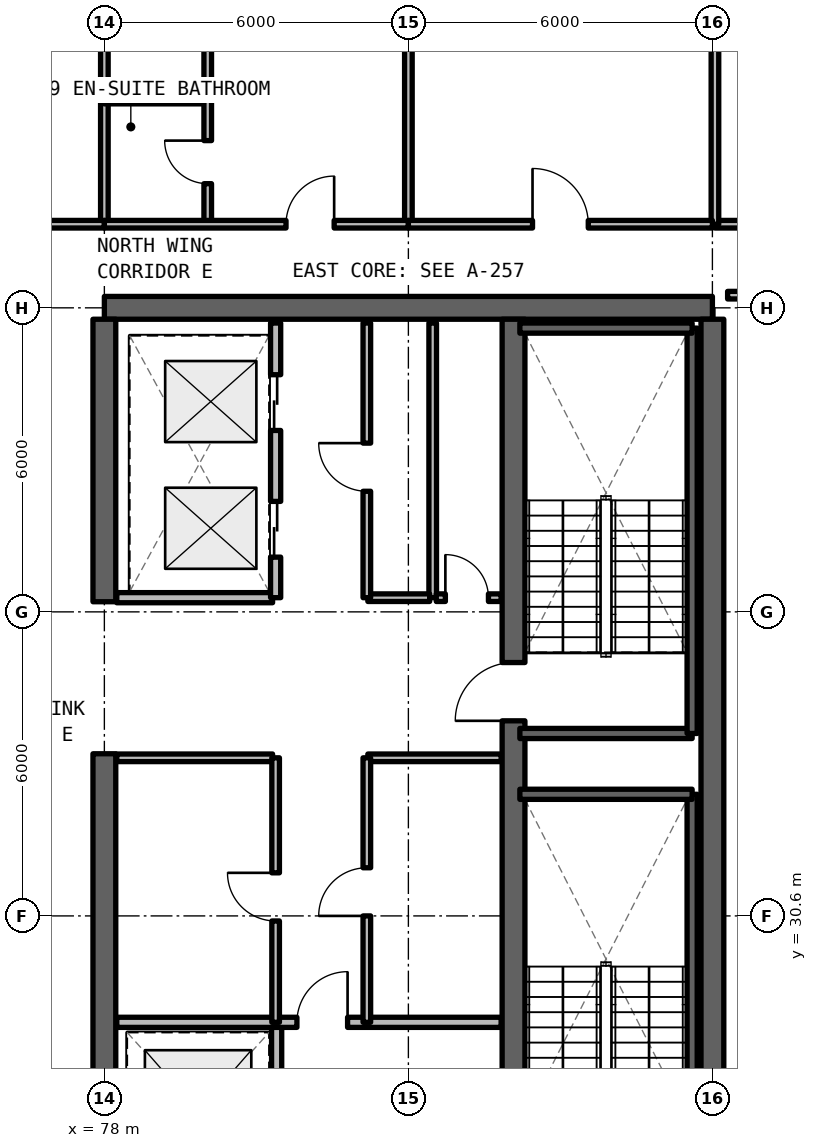
"""IFC4 building model, lengths in metres.
Left out: names, types, materials, properties, quantities, classifications, styles, units other than length and angle.
Written with IfcOpenShell. Run it as: python <this file> out.ifc"""

import sys

from ifc_helpers import new_model, si_unit, direction, frame, frame_2d, origin, place, context, subcontext, project, spatial, rectangle, extrude, element, fill, save


model = new_model("IFC4")
c1 = context("Model", 3, precision=1e-05, world=origin(), true_north=direction((0.0, 1.0)))
c2 = subcontext(c1, "Body", "Model", "MODEL_VIEW")
j1 = project(units=[si_unit("LENGTHUNIT", "METRE"), si_unit("PLANEANGLEUNIT", "RADIAN")], contexts=[c1])
p1 = place(None, origin())
s1 = spatial("IfcSite", under=j1, at=p1, CompositionType="ELEMENT")
p2 = place(p1, origin())
s2 = spatial("IfcBuilding", under=s1, at=p2, CompositionType="ELEMENT")
p3 = place(p2, frame((0.0, 0.0, 260.7)))
s3 = spatial("IfcBuildingStorey", under=s2, at=p3, CompositionType="ELEMENT", Elevation=260.7)
p4 = place(p3, frame((90.0, 42.6, 0.0), z_axis=(0.0, 0.0, 1.0), x_axis=(-1.0, 0.0, 0.0)))
e1 = element("IfcWall", 1, at=p4, inside=s3, PredefinedType="SHEAR", context=c2, shape_type="SweptSolid", body=[
    extrude(rectangle(XDim=12.0, YDim=0.45, at=frame_2d((6.0, 0.0))), origin(), (0.0, 0.0, 1.0), 3.63),
])
p5 = place(p3, frame((90.0, 24.825, 0.0), z_axis=(0.0, 0.0, 1.0), x_axis=(0.0, 1.0, 0.0)))
e2 = element("IfcWall", 2, at=p5, inside=s3, PredefinedType="SHEAR", context=c2, shape_type="SweptSolid", body=[
    extrude(rectangle(XDim=17.55, YDim=0.45, at=frame_2d((8.775, 0.0))), origin(), (0.0, 0.0, 1.0), 3.63),
])
p6 = place(p3, frame((78.0, 24.825, 0.0), z_axis=(0.0, 0.0, 1.0), x_axis=(0.0, 1.0, 0.0)))
e3 = element("IfcWall", 3, at=p6, inside=s3, PredefinedType="SHEAR", context=c2, shape_type="SweptSolid", body=[
    extrude(rectangle(XDim=8.975, YDim=0.45, at=frame_2d((4.488, 0.0))), origin(), (0.0, 0.0, 1.0), 3.63),
])
p7 = place(p3, frame((78.0, 36.8, 0.0), z_axis=(0.0, 0.0, 1.0), x_axis=(0.0, 1.0, 0.0)))
e4 = element("IfcWall", 4, at=p7, inside=s3, PredefinedType="SHEAR", context=c2, shape_type="SweptSolid", body=[
    extrude(rectangle(XDim=5.575, YDim=0.45, at=frame_2d((2.788, 0.0))), origin(), (0.0, 0.0, 1.0), 3.63),
])
p8 = place(p3, frame((86.075, 24.825, 0.0), z_axis=(0.0, 0.0, 1.0), x_axis=(0.0, 1.0, 0.0)))
e5 = element("IfcWall", 5, at=p8, inside=s3, PredefinedType="SHEAR", context=c2, shape_type="SweptSolid", body=[
    extrude(rectangle(XDim=17.55, YDim=0.45, at=frame_2d((8.775, 0.0))), origin(), (0.0, 0.0, 1.0), 3.63),
])
p9 = place(p8, frame((0.425, 0.0, 0.0)))
e6 = element("IfcOpeningElement", 6, at=p9, cuts=e5, PredefinedType="OPENING", context=c2, shape_type="SweptSolid", body=[
    extrude(rectangle(XDim=1.15, YDim=2.15, at=frame_2d((0.575, 1.075))), frame((0.0, 0.235, 0.0), z_axis=(0.0, -1.0, 0.0), x_axis=(1.0, 0.0, 0.0)), (0.0, 0.0, 1.0), 0.47),
])
p10 = place(p8, frame((9.625, 0.0, 0.0)))
e7 = element("IfcOpeningElement", 7, at=p10, cuts=e5, PredefinedType="OPENING", context=c2, shape_type="SweptSolid", body=[
    extrude(rectangle(XDim=1.15, YDim=2.15, at=frame_2d((0.575, 1.075))), frame((0.0, 0.235, 0.0), z_axis=(0.0, -1.0, 0.0), x_axis=(1.0, 0.0, 0.0)), (0.0, 0.0, 1.0), 0.47),
])
p11 = place(p3, frame((81.4, 24.92, 0.0), z_axis=(0.0, 0.0, 1.0), x_axis=(0.0, 1.0, 0.0)))
e8 = element("IfcWall", 8, at=p11, inside=s3, PredefinedType="SOLIDWALL", context=c2, shape_type="SweptSolid", body=[
    extrude(rectangle(XDim=3.58, YDim=0.2, at=frame_2d((1.79, 0.0))), origin(), (0.0, 0.0, 1.0), 2.63),
])
p12 = place(p11, frame((1.3, 0.0, 0.0)))
e9 = element("IfcOpeningElement", 9, at=p12, cuts=e8, PredefinedType="OPENING", context=c2, shape_type="SweptSolid", body=[
    extrude(rectangle(XDim=1.1, YDim=2.2, at=frame_2d((0.55, 1.1))), frame((0.0, 0.11, 0.0), z_axis=(0.0, -1.0, 0.0), x_axis=(1.0, 0.0, 0.0)), (0.0, 0.0, 1.0), 0.22),
])
p13 = place(p3, frame((78.245, 28.5, 0.0), z_axis=(0.0, 0.0, 1.0), x_axis=(1.0, 0.0, 0.0)))
e10 = element("IfcWall", 10, at=p13, inside=s3, PredefinedType="SOLIDWALL", context=c2, shape_type="SweptSolid", body=[
    extrude(rectangle(XDim=7.585, YDim=0.2, at=frame_2d((3.792, 0.0))), origin(), (0.0, 0.0, 1.0), 2.63),
])
p14 = place(p13, frame((3.555, 0.0, 0.0)))
e11 = element("IfcOpeningElement", 11, at=p14, cuts=e10, PredefinedType="OPENING", context=c2, shape_type="SweptSolid", body=[
    extrude(rectangle(XDim=1.0, YDim=2.15, at=frame_2d((0.5, 1.075))), frame((0.0, 0.11, 0.0), z_axis=(0.0, -1.0, 0.0), x_axis=(1.0, 0.0, 0.0)), (0.0, 0.0, 1.0), 0.22),
])
p15 = place(p3, frame((83.2, 33.72, 0.0), z_axis=(0.0, 0.0, 1.0), x_axis=(1.0, 0.0, 0.0)))
e12 = element("IfcWall", 12, at=p15, inside=s3, PredefinedType="SOLIDWALL", context=c2, shape_type="SweptSolid", body=[
    extrude(rectangle(XDim=2.63, YDim=0.15, at=frame_2d((1.315, 0.0))), origin(), (0.0, 0.0, 1.0), 2.63),
])
p16 = place(p3, frame((83.18, 28.5, 0.0), z_axis=(0.0, 0.0, 1.0), x_axis=(0.0, 1.0, 0.0)))
e13 = element("IfcWall", 13, at=p16, inside=s3, PredefinedType="SOLIDWALL", context=c2, shape_type="SweptSolid", body=[
    extrude(rectangle(XDim=5.22, YDim=0.15, at=frame_2d((2.61, 0.0))), origin(), (0.0, 0.0, 1.0), 2.63),
])
p17 = place(p16, frame((2.1, 0.0, 0.0)))
e14 = element("IfcOpeningElement", 14, at=p17, cuts=e13, PredefinedType="OPENING", context=c2, shape_type="SweptSolid", body=[
    extrude(rectangle(XDim=0.95, YDim=2.15, at=frame_2d((0.475, 1.075))), frame((0.0, 0.085, 0.0), z_axis=(0.0, -1.0, 0.0), x_axis=(1.0, 0.0, 0.0)), (0.0, 0.0, 1.0), 0.17),
])
p18 = place(p3, frame((78.245, 33.72, 0.0), z_axis=(0.0, 0.0, 1.0), x_axis=(1.0, 0.0, 0.0)))
e15 = element("IfcWall", 15, at=p18, inside=s3, PredefinedType="SOLIDWALL", context=c2, shape_type="SweptSolid", body=[
    extrude(rectangle(XDim=3.075, YDim=0.15, at=frame_2d((1.538, 0.0))), origin(), (0.0, 0.0, 1.0), 2.63),
])
p19 = place(p3, frame((81.38, 28.5, 0.0), z_axis=(0.0, 0.0, 1.0), x_axis=(0.0, 1.0, 0.0)))
e16 = element("IfcWall", 16, at=p19, inside=s3, PredefinedType="SOLIDWALL", context=c2, shape_type="SweptSolid", body=[
    extrude(rectangle(XDim=5.22, YDim=0.15, at=frame_2d((2.61, 0.0))), origin(), (0.0, 0.0, 1.0), 2.63),
])
p20 = place(p19, frame((2.0, 0.0, 0.0)))
e17 = element("IfcOpeningElement", 17, at=p20, cuts=e16, PredefinedType="OPENING", context=c2, shape_type="SweptSolid", body=[
    extrude(rectangle(XDim=0.95, YDim=2.15, at=frame_2d((0.475, 1.075))), frame((0.0, 0.085, 0.0), z_axis=(0.0, -1.0, 0.0), x_axis=(1.0, 0.0, 0.0)), (0.0, 0.0, 1.0), 0.17),
])
p21 = place(p3, frame((84.48, 36.88, 0.0), z_axis=(0.0, 0.0, 1.0), x_axis=(0.0, 1.0, 0.0)))
e18 = element("IfcWall", 18, at=p21, inside=s3, PredefinedType="SOLIDWALL", context=c2, shape_type="SweptSolid", body=[
    extrude(rectangle(XDim=5.42, YDim=0.15, at=frame_2d((2.71, 0.0))), origin(), (0.0, 0.0, 1.0), 2.63),
])
p22 = place(p3, frame((84.55, 36.88, 0.0), z_axis=(0.0, 0.0, 1.0), x_axis=(1.0, 0.0, 0.0)))
e19 = element("IfcWall", 19, at=p22, inside=s3, PredefinedType="SOLIDWALL", context=c2, shape_type="SweptSolid", body=[
    extrude(rectangle(XDim=1.28, YDim=0.15, at=frame_2d((0.64, 0.0))), origin(), (0.0, 0.0, 1.0), 2.63),
])
p23 = place(p22, frame((0.18, 0.0, 0.0)))
e20 = element("IfcOpeningElement", 20, at=p23, cuts=e19, PredefinedType="OPENING", context=c2, shape_type="SweptSolid", body=[
    extrude(rectangle(XDim=0.85, YDim=2.1, at=frame_2d((0.425, 1.05))), frame((0.0, 0.085, 0.0), z_axis=(0.0, -1.0, 0.0), x_axis=(1.0, 0.0, 0.0)), (0.0, 0.0, 1.0), 0.17),
])
p24 = place(p3, frame((83.2, 36.88, 0.0), z_axis=(0.0, 0.0, 1.0), x_axis=(1.0, 0.0, 0.0)))
e21 = element("IfcWall", 21, at=p24, inside=s3, PredefinedType="SOLIDWALL", context=c2, shape_type="SweptSolid", body=[
    extrude(rectangle(XDim=1.22, YDim=0.15, at=frame_2d((0.61, 0.0))), origin(), (0.0, 0.0, 1.0), 2.63),
])
p25 = place(p3, frame((83.18, 36.88, 0.0), z_axis=(0.0, 0.0, 1.0), x_axis=(0.0, 1.0, 0.0)))
e22 = element("IfcWall", 22, at=p25, inside=s3, PredefinedType="SOLIDWALL", context=c2, shape_type="SweptSolid", body=[
    extrude(rectangle(XDim=5.42, YDim=0.15, at=frame_2d((2.71, 0.0))), origin(), (0.0, 0.0, 1.0), 2.63),
])
p26 = place(p25, frame((2.1, 0.0, 0.0)))
e23 = element("IfcOpeningElement", 23, at=p26, cuts=e22, PredefinedType="OPENING", context=c2, shape_type="SweptSolid", body=[
    extrude(rectangle(XDim=0.95, YDim=2.15, at=frame_2d((0.475, 1.075))), frame((0.0, 0.085, 0.0), z_axis=(0.0, -1.0, 0.0), x_axis=(1.0, 0.0, 0.0)), (0.0, 0.0, 1.0), 0.17),
])
p27 = place(p3, frame((78.245, 36.88, 0.0), z_axis=(0.0, 0.0, 1.0), x_axis=(1.0, 0.0, 0.0)))
e24 = element("IfcWall", 24, at=p27, inside=s3, PredefinedType="SOLIDWALL", context=c2, shape_type="SweptSolid", body=[
    extrude(rectangle(XDim=3.075, YDim=0.2, at=frame_2d((1.538, 0.0))), origin(), (0.0, 0.0, 1.0), 2.63),
])
p28 = place(p3, frame((81.38, 36.88, 0.0), z_axis=(0.0, 0.0, 1.0), x_axis=(0.0, 1.0, 0.0)))
e25 = element("IfcWall", 25, at=p28, inside=s3, PredefinedType="SOLIDWALL", context=c2, shape_type="SweptSolid", body=[
    extrude(rectangle(XDim=5.42, YDim=0.2, at=frame_2d((2.71, 0.0))), origin(), (0.0, 0.0, 1.0), 2.63),
])
p29 = place(p28, frame((0.8, 0.0, 0.0)))
e26 = element("IfcOpeningElement", 26, at=p29, cuts=e25, PredefinedType="OPENING", context=c2, shape_type="SweptSolid", body=[
    extrude(rectangle(XDim=1.1, YDim=2.2, at=frame_2d((0.55, 1.1))), frame((0.0, 0.11, 0.0), z_axis=(0.0, -1.0, 0.0), x_axis=(1.0, 0.0, 0.0)), (0.0, 0.0, 1.0), 0.22),
])
p30 = place(p28, frame((3.3, 0.0, 0.0)))
e27 = element("IfcOpeningElement", 27, at=p30, cuts=e25, PredefinedType="OPENING", context=c2, shape_type="SweptSolid", body=[
    extrude(rectangle(XDim=1.1, YDim=2.2, at=frame_2d((0.55, 1.1))), frame((0.0, 0.11, 0.0), z_axis=(0.0, -1.0, 0.0), x_axis=(1.0, 0.0, 0.0)), (0.0, 0.0, 1.0), 0.22),
])
p31 = place(p3, frame((90.3, 42.85, 0.0), z_axis=(0.0, 0.0, 1.0), x_axis=(1.0, 0.0, 0.0)))
e28 = element("IfcWall", 28, at=p31, inside=s3, PredefinedType="SOLIDWALL", context=c2, shape_type="SweptSolid", body=[
    extrude(rectangle(XDim=8.52, YDim=0.15, at=frame_2d((4.26, 0.0))), origin(), (0.0, 0.0, 1.0), 2.63),
])
p32 = place(p3, frame((90.05, 44.25, 0.0), z_axis=(0.0, 0.0, 1.0), x_axis=(1.0, 0.0, 0.0)))
e29 = element("IfcWall", 29, at=p32, inside=s3, PredefinedType="SOLIDWALL", context=c2, shape_type="SweptSolid", body=[
    extrude(rectangle(XDim=5.37, YDim=0.15, at=frame_2d((2.685, 0.0))), origin(), (0.0, 0.0, 1.0), 2.63),
])
p33 = place(p32, frame((1.125, 0.0, 0.0)))
e30 = element("IfcOpeningElement", 30, at=p33, cuts=e29, PredefinedType="OPENING", context=c2, shape_type="SweptSolid", body=[
    extrude(rectangle(XDim=0.85, YDim=2.1, at=frame_2d((0.425, 1.05))), frame((0.0, 0.085, 0.0), z_axis=(0.0, -1.0, 0.0), x_axis=(1.0, 0.0, 0.0)), (0.0, 0.0, 1.0), 0.17),
])
for number, where, z_axis, x_axis in (
    (31, (90.05, 44.25, 0.0), (0.0, 0.0, 1.0), (0.0, 1.0, 0.0)),
    (32, (78.0, 44.25, 0.0), (0.0, 0.0, 1.0), (0.0, 1.0, 0.0)),
):
    element("IfcWall", number, at=place(p3, frame(where, z_axis=z_axis, x_axis=x_axis)), inside=s3, PredefinedType="SOLIDWALL", context=c2, shape_type="SweptSolid", body=[
        extrude(rectangle(XDim=10.61, YDim=0.15, at=frame_2d((5.305, 0.0))), origin(), (0.0, 0.0, 1.0), 2.63),
    ])
p34 = place(p3, frame((72.0, 44.25, 0.0), z_axis=(0.0, 0.0, 1.0), x_axis=(1.0, 0.0, 0.0)))
e33 = element("IfcWall", 33, at=p34, inside=s3, PredefinedType="SOLIDWALL", context=c2, shape_type="SweptSolid", body=[
    extrude(rectangle(XDim=6.0, YDim=0.15, at=frame_2d((3.0, 0.0))), origin(), (0.0, 0.0, 1.0), 2.63),
])
p35 = place(p34, frame((2.45, 0.0, 0.0)))
e34 = element("IfcOpeningElement", 34, at=p35, cuts=e33, PredefinedType="OPENING", context=c2, shape_type="SweptSolid", body=[
    extrude(rectangle(XDim=1.1, YDim=2.15, at=frame_2d((0.55, 1.075))), frame((0.0, 0.085, 0.0), z_axis=(0.0, -1.0, 0.0), x_axis=(1.0, 0.0, 0.0)), (0.0, 0.0, 1.0), 0.17),
])
p36 = place(p3, frame((84.0, 44.25, 0.0), z_axis=(0.0, 0.0, 1.0), x_axis=(0.0, 1.0, 0.0)))
e35 = element("IfcWall", 35, at=p36, inside=s3, PredefinedType="SOLIDWALL", context=c2, shape_type="SweptSolid", body=[
    extrude(rectangle(XDim=10.61, YDim=0.15, at=frame_2d((5.305, 0.0))), origin(), (0.0, 0.0, 1.0), 2.63),
])
p37 = place(p3, frame((78.0, 46.7, 0.0), z_axis=(0.0, 0.0, 1.0), x_axis=(1.0, 0.0, 0.0)))
e36 = element("IfcWall", 36, at=p37, inside=s3, PredefinedType="PARTITIONING", context=c2, shape_type="SweptSolid", body=[
    extrude(rectangle(XDim=2.04, YDim=0.15, at=frame_2d((1.02, 0.0))), origin(), (0.0, 0.0, 1.0), 2.63),
])
p38 = place(p3, frame((80.04, 44.25, 0.0), z_axis=(0.0, 0.0, 1.0), x_axis=(0.0, 1.0, 0.0)))
e37 = element("IfcWall", 37, at=p38, inside=s3, PredefinedType="PARTITIONING", context=c2, shape_type="SweptSolid", body=[
    extrude(rectangle(XDim=10.61, YDim=0.15, at=frame_2d((5.305, 0.0))), origin(), (0.0, 0.0, 1.0), 2.63),
])
p39 = place(p38, frame((0.8, 0.0, 0.0)))
e38 = element("IfcOpeningElement", 38, at=p39, cuts=e37, PredefinedType="OPENING", context=c2, shape_type="SweptSolid", body=[
    extrude(rectangle(XDim=0.85, YDim=2.1, at=frame_2d((0.425, 1.05))), frame((0.0, 0.085, 0.0), z_axis=(0.0, -1.0, 0.0), x_axis=(1.0, 0.0, 0.0)), (0.0, 0.0, 1.0), 0.17),
])
p40 = place(p38, frame((5.374, 0.0, 0.0)))
e39 = element("IfcOpeningElement", 39, at=p40, cuts=e37, PredefinedType="OPENING", context=c2, shape_type="SweptSolid", body=[
    extrude(rectangle(XDim=0.85, YDim=2.1, at=frame_2d((0.425, 1.05))), frame((0.0, 0.085, 0.0), z_axis=(0.0, -1.0, 0.0), x_axis=(1.0, 0.0, 0.0)), (0.0, 0.0, 1.0), 0.17),
])
p41 = place(p3, frame((78.0, 44.25, 0.0), z_axis=(0.0, 0.0, 1.0), x_axis=(1.0, 0.0, 0.0)))
e40 = element("IfcWall", 40, at=p41, inside=s3, PredefinedType="SOLIDWALL", context=c2, shape_type="SweptSolid", body=[
    extrude(rectangle(XDim=6.0, YDim=0.15, at=frame_2d((3.0, 0.0))), origin(), (0.0, 0.0, 1.0), 2.63),
])
p42 = place(p41, frame((3.585, 0.0, 0.0)))
e41 = element("IfcOpeningElement", 41, at=p42, cuts=e40, PredefinedType="OPENING", context=c2, shape_type="SweptSolid", body=[
    extrude(rectangle(XDim=0.95, YDim=2.15, at=frame_2d((0.475, 1.075))), frame((0.0, 0.085, 0.0), z_axis=(0.0, -1.0, 0.0), x_axis=(1.0, 0.0, 0.0)), (0.0, 0.0, 1.0), 0.17),
])
p43 = place(p3, frame((84.0, 44.25, 0.0), z_axis=(0.0, 0.0, 1.0), x_axis=(1.0, 0.0, 0.0)))
e42 = element("IfcWall", 42, at=p43, inside=s3, PredefinedType="SOLIDWALL", context=c2, shape_type="SweptSolid", body=[
    extrude(rectangle(XDim=6.0, YDim=0.15, at=frame_2d((3.0, 0.0))), origin(), (0.0, 0.0, 1.0), 2.63),
])
p44 = place(p43, frame((2.45, 0.0, 0.0)))
e43 = element("IfcOpeningElement", 43, at=p44, cuts=e42, PredefinedType="OPENING", context=c2, shape_type="SweptSolid", body=[
    extrude(rectangle(XDim=1.1, YDim=2.15, at=frame_2d((0.55, 1.075))), frame((0.0, 0.085, 0.0), z_axis=(0.0, -1.0, 0.0), x_axis=(1.0, 0.0, 0.0)), (0.0, 0.0, 1.0), 0.17),
])
p45 = place(p3, frame((89.6, 25.0, 0.0), z_axis=(0.0, 0.0, 1.0), x_axis=(0.0, 1.0, 0.0)))
e44 = element("IfcWall", 44, at=p45, inside=s3, PredefinedType="SOLIDWALL", context=c2, shape_type="SweptSolid", body=[
    extrude(rectangle(XDim=8.0, YDim=0.2, at=frame_2d((4.0, 0.0))), origin(), (0.0, 0.0, 1.0), 3.63),
])
for number, where, z_axis, x_axis in (
    (45, (89.6, 33.0, 0.0), (0.0, 0.0, 1.0), (-1.0, 0.0, 0.0)),
    (46, (86.2, 34.2, 0.0), (0.0, 0.0, 1.0), (1.0, 0.0, 0.0)),
):
    element("IfcWall", number, at=place(p3, frame(where, z_axis=z_axis, x_axis=x_axis)), inside=s3, PredefinedType="SOLIDWALL", context=c2, shape_type="SweptSolid", body=[
        extrude(rectangle(XDim=3.4, YDim=0.2, at=frame_2d((1.7, 0.0))), origin(), (0.0, 0.0, 1.0), 3.63),
    ])
p46 = place(p3, frame((89.6, 34.2, 0.0), z_axis=(0.0, 0.0, 1.0), x_axis=(0.0, 1.0, 0.0)))
e47 = element("IfcWall", 47, at=p46, inside=s3, PredefinedType="SOLIDWALL", context=c2, shape_type="SweptSolid", body=[
    extrude(rectangle(XDim=8.0, YDim=0.2, at=frame_2d((4.0, 0.0))), origin(), (0.0, 0.0, 1.0), 3.63),
])
p47 = place(p3, frame((89.6, 42.2, 0.0), z_axis=(0.0, 0.0, 1.0), x_axis=(-1.0, 0.0, 0.0)))
e48 = element("IfcWall", 48, at=p47, inside=s3, PredefinedType="SOLIDWALL", context=c2, shape_type="SweptSolid", body=[
    extrude(rectangle(XDim=3.4, YDim=0.2, at=frame_2d((1.7, 0.0))), origin(), (0.0, 0.0, 1.0), 3.63),
])
p48 = place(p14, origin())
e49 = element("IfcDoor", 49, at=p48, inside=s3, OperationType="SINGLE_SWING_RIGHT", PredefinedType="DOOR", context=c2, shape_type="SweptSolid", body=[
    extrude(rectangle(XDim=1.0, YDim=2.15, at=frame_2d((0.5, 1.075))), frame((0.0, 0.025, 0.0), z_axis=(0.0, -1.0, 0.0), x_axis=(1.0, 0.0, 0.0)), (0.0, 0.0, 1.0), 0.05),
])
fill(e11, e49)
p49 = place(p17, origin())
e50 = element("IfcDoor", 50, at=p49, inside=s3, OperationType="SINGLE_SWING_LEFT", PredefinedType="DOOR", context=c2, shape_type="SweptSolid", body=[
    extrude(rectangle(XDim=0.95, YDim=2.15, at=frame_2d((0.475, 1.075))), frame((0.0, 0.025, 0.0), z_axis=(0.0, -1.0, 0.0), x_axis=(1.0, 0.0, 0.0)), (0.0, 0.0, 1.0), 0.05),
])
fill(e14, e50)
p50 = place(p20, origin())
e51 = element("IfcDoor", 51, at=p50, inside=s3, OperationType="SINGLE_SWING_RIGHT", PredefinedType="DOOR", context=c2, shape_type="SweptSolid", body=[
    extrude(rectangle(XDim=0.95, YDim=2.15, at=frame_2d((0.475, 1.075))), frame((0.0, 0.025, 0.0), z_axis=(0.0, -1.0, 0.0), x_axis=(1.0, 0.0, 0.0)), (0.0, 0.0, 1.0), 0.05),
])
fill(e17, e51)
p51 = place(p23, origin())
e52 = element("IfcDoor", 52, at=p51, inside=s3, OperationType="SINGLE_SWING_LEFT", PredefinedType="DOOR", context=c2, shape_type="SweptSolid", body=[
    extrude(rectangle(XDim=0.85, YDim=2.1, at=frame_2d((0.425, 1.05))), frame((0.0, 0.025, 0.0), z_axis=(0.0, -1.0, 0.0), x_axis=(1.0, 0.0, 0.0)), (0.0, 0.0, 1.0), 0.05),
])
fill(e20, e52)
p52 = place(p26, origin())
e53 = element("IfcDoor", 53, at=p52, inside=s3, OperationType="SINGLE_SWING_RIGHT", PredefinedType="DOOR", context=c2, shape_type="SweptSolid", body=[
    extrude(rectangle(XDim=0.95, YDim=2.15, at=frame_2d((0.475, 1.075))), frame((0.0, 0.025, 0.0), z_axis=(0.0, -1.0, 0.0), x_axis=(1.0, 0.0, 0.0)), (0.0, 0.0, 1.0), 0.05),
])
fill(e23, e53)
p53 = place(p29, origin())
e54 = element("IfcDoor", 54, at=p53, inside=s3, OperationType="SLIDING_TO_LEFT", PredefinedType="DOOR", context=c2, shape_type="SweptSolid", body=[
    extrude(rectangle(XDim=1.1, YDim=2.2, at=frame_2d((0.55, 1.1))), frame((0.0, 0.025, 0.0), z_axis=(0.0, -1.0, 0.0), x_axis=(1.0, 0.0, 0.0)), (0.0, 0.0, 1.0), 0.05),
])
fill(e26, e54)
p54 = place(p30, origin())
e55 = element("IfcDoor", 55, at=p54, inside=s3, OperationType="SLIDING_TO_RIGHT", PredefinedType="DOOR", context=c2, shape_type="SweptSolid", body=[
    extrude(rectangle(XDim=1.1, YDim=2.2, at=frame_2d((0.55, 1.1))), frame((0.0, 0.025, 0.0), z_axis=(0.0, -1.0, 0.0), x_axis=(1.0, 0.0, 0.0)), (0.0, 0.0, 1.0), 0.05),
])
fill(e27, e55)
p55 = place(p39, origin())
e56 = element("IfcDoor", 56, at=p55, inside=s3, OperationType="SINGLE_SWING_RIGHT", PredefinedType="DOOR", context=c2, shape_type="SweptSolid", body=[
    extrude(rectangle(XDim=0.85, YDim=2.1, at=frame_2d((0.425, 1.05))), frame((0.0, 0.025, 0.0), z_axis=(0.0, -1.0, 0.0), x_axis=(1.0, 0.0, 0.0)), (0.0, 0.0, 1.0), 0.05),
])
fill(e38, e56)
p56 = place(p42, origin())
e57 = element("IfcDoor", 57, at=p56, inside=s3, OperationType="SINGLE_SWING_RIGHT", PredefinedType="DOOR", context=c2, shape_type="SweptSolid", body=[
    extrude(rectangle(XDim=0.95, YDim=2.15, at=frame_2d((0.475, 1.075))), frame((0.0, 0.025, 0.0), z_axis=(0.0, -1.0, 0.0), x_axis=(1.0, 0.0, 0.0)), (0.0, 0.0, 1.0), 0.05),
])
fill(e41, e57)
p57 = place(p44, origin())
e58 = element("IfcDoor", 58, at=p57, inside=s3, OperationType="SINGLE_SWING_LEFT", PredefinedType="DOOR", context=c2, shape_type="SweptSolid", body=[
    extrude(rectangle(XDim=1.1, YDim=2.15, at=frame_2d((0.55, 1.075))), frame((0.0, 0.025, 0.0), z_axis=(0.0, -1.0, 0.0), x_axis=(1.0, 0.0, 0.0)), (0.0, 0.0, 1.0), 0.05),
])
fill(e43, e58)
p58 = place(p10, origin())
e59 = element("IfcDoor", 59, at=p58, inside=s3, OperationType="SINGLE_SWING_RIGHT", PredefinedType="DOOR", context=c2, shape_type="SweptSolid", body=[
    extrude(rectangle(XDim=1.15, YDim=2.15, at=frame_2d((0.575, 1.075))), frame((0.0, 0.025, 0.0), z_axis=(0.0, -1.0, 0.0), x_axis=(1.0, 0.0, 0.0)), (0.0, 0.0, 1.0), 0.05),
])
fill(e7, e59)
save(model, sys.argv[1])
